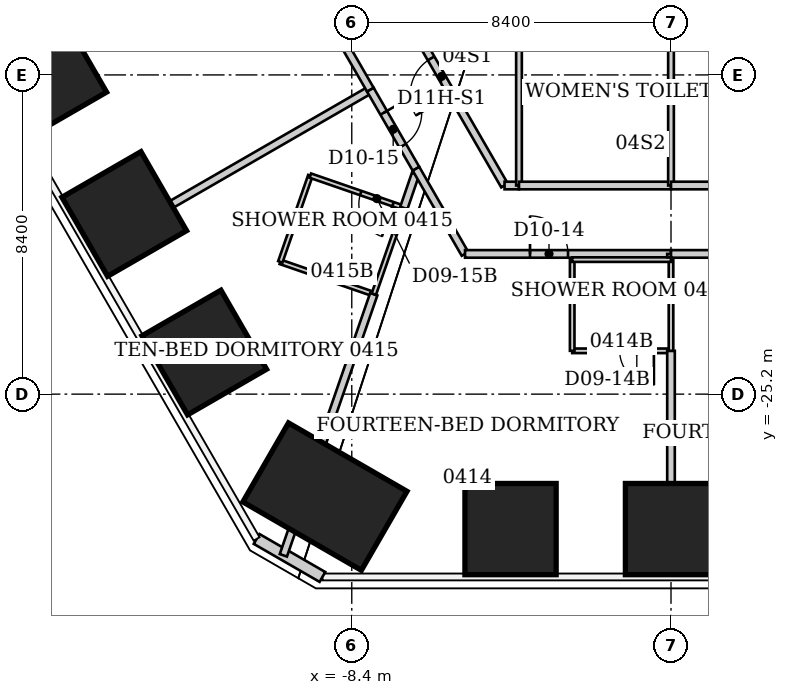
"""IFC4 building model, lengths in metres.
Left out: names, types, materials, properties, quantities, classifications, styles, units other than length and angle.
Written with IfcOpenShell. Run it as: python <this file> out.ifc"""

import sys

from ifc_helpers import new_model, si_unit, direction, frame, frame_2d, origin, origin_2d, place, context, subcontext, project, spatial, rectangle, extrude, element, fill, save


model = new_model("IFC4")
c1 = context("Model", 3, precision=1e-05, world=origin(), true_north=direction((0.0, 1.0)))
c2 = subcontext(c1, "Body", "Model", "MODEL_VIEW")
j1 = project(units=[si_unit("LENGTHUNIT", "METRE"), si_unit("PLANEANGLEUNIT", "RADIAN")], contexts=[c1])
p1 = place(None, origin())
s1 = spatial("IfcSite", under=j1, at=p1, CompositionType="ELEMENT")
p2 = place(p1, origin())
s2 = spatial("IfcBuilding", under=s1, at=p2, CompositionType="ELEMENT")
p3 = place(p2, frame((0.0, 0.0, 23.0)))
s3 = spatial("IfcBuildingStorey", under=s2, at=p3, CompositionType="ELEMENT", Elevation=23.0)
for number, where, z_axis, x_axis in (
    (1, (0.0, -28.751, 0.0), (0.0, 0.0, 1.0), (0.0, -1.0, 0.0)),
    (2, (-4.222, -28.751, 0.0), (0.0, 0.0, 1.0), (0.0, -1.0, 0.0)),
):
    element("IfcColumn", number, at=place(p3, frame(where, z_axis=z_axis, x_axis=x_axis)), inside=s3, PredefinedType="COLUMN", context=c2, shape_type="SweptSolid", body=[
        extrude(rectangle(XDim=2.4, YDim=2.4, at=origin_2d()), origin(), (0.0, 0.0, 1.0), 3.8),
    ])
p4 = place(p3, frame((-9.106, -27.897, 0.0), z_axis=(0.0, 0.0, 1.0), x_axis=(-0.5, -0.866025403784, 0.0)))
e3 = element("IfcColumn", 3, at=p4, inside=s3, PredefinedType="COLUMN", context=c2, shape_type="SweptSolid", body=[
    extrude(rectangle(XDim=2.4, YDim=3.6, at=origin_2d()), origin(), (0.0, 0.0, 1.0), 3.8),
])
for number, where, z_axis, x_axis in (
    (4, (-12.282, -24.105, 0.0), (0.0, 0.0, 1.0), (-0.866, -0.5, 0.0)),
    (5, (-14.387, -20.459, 0.0), (0.0, 0.0, 1.0), (-0.866, -0.5, 0.0)),
    (6, (-16.491, -16.813, 0.0), (0.0, 0.0, 1.0), (-0.866, -0.5, 0.0)),
):
    element("IfcColumn", number, at=place(p3, frame(where, z_axis=z_axis, x_axis=x_axis)), inside=s3, PredefinedType="COLUMN", context=c2, shape_type="SweptSolid", body=[
        extrude(rectangle(XDim=2.4, YDim=2.4, at=origin_2d()), origin(), (0.0, 0.0, 1.0), 3.8),
    ])
p5 = place(p3, frame((-9.172, -30.011, 0.0), z_axis=(0.0, 0.0, 1.0), x_axis=(-0.866010750942, 0.50002537861, 0.0)))
e7 = element("IfcWall", 7, at=p5, inside=s3, PredefinedType="SOLIDWALL", context=c2, shape_type="SweptSolid", body=[
    extrude(rectangle(XDim=2.0, YDim=0.3, at=frame_2d((1.0, 0.0))), origin(), (0.0, 0.0, 1.0), 3.64),
])
p6 = place(p3, frame((-15.176, -21.38, 0.0), z_axis=(0.0, 0.0, 1.0), x_axis=(0.866276837306, 0.49956425127, 0.0)))
e8 = element("IfcWall", 8, at=p6, inside=s3, PredefinedType="PARTITIONING", context=c2, shape_type="SweptSolid", body=[
    extrude(rectangle(XDim=8.373, YDim=0.2, at=frame_2d((4.186, 0.0))), origin(), (0.0, 0.0, 1.0), 3.64),
])
p7 = place(p3, frame((-11.06, -11.74, 0.0), z_axis=(0.0, 0.0, 1.0), x_axis=(0.500384855356, -0.865803093394, 0.0)))
e9 = element("IfcWall", 9, at=p7, inside=s3, PredefinedType="PARTITIONING", context=c2, shape_type="SweptSolid", body=[
    extrude(rectangle(XDim=6.295, YDim=0.2, at=frame_2d((3.147, 0.0))), origin(), (0.0, 0.0, 1.0), 3.64),
])
p8 = place(p7, frame((2.647, 0.0, 0.0)))
e10 = element("IfcOpeningElement", 10, at=p8, cuts=e9, PredefinedType="OPENING", context=c2, shape_type="SweptSolid", body=[
    extrude(rectangle(XDim=1.0, YDim=2.13, at=frame_2d((0.5, 1.065))), frame((0.0, 0.1, 0.0), z_axis=(0.0, -1.0, 0.0), x_axis=(1.0, 0.0, 0.0)), (0.0, 0.0, 1.0), 0.2),
])
p9 = place(p3, frame((-10.28, -21.72, 0.0), z_axis=(0.0, 0.0, 1.0), x_axis=(0.94515546045, -0.326620813149, 0.0)))
e11 = element("IfcWall", 11, at=p9, inside=s3, PredefinedType="PARTITIONING", context=c2, shape_type="SweptSolid", body=[
    extrude(rectangle(XDim=2.603, YDim=0.12, at=frame_2d((1.301, 0.0))), origin(), (0.0, 0.0, 1.0), 3.64),
])
p10 = place(p3, frame((-10.2, -29.442, 0.0), z_axis=(0.0, 0.0, 1.0), x_axis=(0.327154379454, 0.944970905374, 0.0)))
e12 = element("IfcWall", 12, at=p10, inside=s3, PredefinedType="PARTITIONING", context=c2, shape_type="SweptSolid", body=[
    extrude(rectangle(XDim=7.272, YDim=0.2, at=frame_2d((3.636, 0.0))), origin(), (0.0, 0.0, 1.0), 3.64),
])
p11 = place(p3, frame((-9.49, -19.45, 0.0), z_axis=(0.0, 0.0, 1.0), x_axis=(-0.328693963496, -0.944436487203, 0.0)))
e13 = element("IfcWall", 13, at=p11, inside=s3, PredefinedType="PARTITIONING", context=c2, shape_type="SweptSolid", body=[
    extrude(rectangle(XDim=2.404, YDim=0.12, at=frame_2d((1.202, 0.0))), origin(), (0.0, 0.0, 1.0), 3.64),
])
p12 = place(p3, frame((-7.91, -17.19, 0.0), z_axis=(0.0, 0.0, 1.0), x_axis=(0.499693115345, -0.866202511239, 0.0)))
e14 = element("IfcWall", 14, at=p12, inside=s3, PredefinedType="PARTITIONING", context=c2, shape_type="SweptSolid", body=[
    extrude(rectangle(XDim=2.401, YDim=0.2, at=frame_2d((1.201, 0.0))), origin(), (0.0, 0.0, 1.0), 3.64),
])
p13 = place(p12, frame((0.701, 0.0, 0.0)))
e15 = element("IfcOpeningElement", 15, at=p13, cuts=e14, PredefinedType="OPENING", context=c2, shape_type="SweptSolid", body=[
    extrude(rectangle(XDim=1.0, YDim=2.13, at=frame_2d((0.5, 1.065))), frame((0.0, 0.1, 0.0), z_axis=(0.0, -1.0, 0.0), x_axis=(1.0, 0.0, 0.0)), (0.0, 0.0, 1.0), 0.2),
])
p14 = place(p3, frame((-7.82, -22.57, 0.0), z_axis=(0.0, 0.0, 1.0), x_axis=(0.328693963496, 0.944436487203, 0.0)))
e16 = element("IfcWall", 16, at=p14, inside=s3, PredefinedType="PARTITIONING", context=c2, shape_type="SweptSolid", body=[
    extrude(rectangle(XDim=2.404, YDim=0.12, at=frame_2d((1.202, 0.0))), origin(), (0.0, 0.0, 1.0), 3.64),
])
p15 = place(p3, frame((-7.03, -20.3, 0.0), z_axis=(0.0, 0.0, 1.0), x_axis=(-0.94515546045, 0.326620813149, 0.0)))
e17 = element("IfcWall", 17, at=p15, inside=s3, PredefinedType="PARTITIONING", context=c2, shape_type="SweptSolid", body=[
    extrude(rectangle(XDim=2.603, YDim=0.12, at=frame_2d((1.301, 0.0))), origin(), (0.0, 0.0, 1.0), 3.64),
])
p16 = place(p15, frame((0.3, 0.0, 0.0)))
e18 = element("IfcOpeningElement", 18, at=p16, cuts=e17, PredefinedType="OPENING", context=c2, shape_type="SweptSolid", body=[
    extrude(rectangle(XDim=0.9, YDim=2.03, at=frame_2d((0.45, 1.015))), frame((0.0, 0.06, 0.0), z_axis=(0.0, -1.0, 0.0), x_axis=(1.0, 0.0, 0.0)), (0.0, 0.0, 1.0), 0.12),
])
p17 = place(p3, frame((-7.03, -20.3, 0.0), z_axis=(0.0, 0.0, 1.0), x_axis=(0.32487799312, 0.945755935528, 0.0)))
e19 = element("IfcWall", 19, at=p17, inside=s3, PredefinedType="PARTITIONING", context=c2, shape_type="SweptSolid", body=[
    extrude(rectangle(XDim=0.947, YDim=0.2, at=frame_2d((0.473, 0.0))), origin(), (0.0, 0.0, 1.0), 3.64),
])
p18 = place(p3, frame((-5.42, -21.51, 0.0), z_axis=(0.0, 0.0, 1.0), x_axis=(-0.499065468721, 0.866564283784, 0.0)))
e20 = element("IfcWall", 20, at=p18, inside=s3, PredefinedType="PARTITIONING", context=c2, shape_type="SweptSolid", body=[
    extrude(rectangle(XDim=2.585, YDim=0.2, at=frame_2d((1.292, 0.0))), origin(), (0.0, 0.0, 1.0), 3.64),
])
p19 = place(p3, frame((-5.42, -21.51, 0.0), z_axis=(0.0, 0.0, 1.0), x_axis=(1.0, 0.0, 0.0)))
e21 = element("IfcWall", 21, at=p19, inside=s3, PredefinedType="PARTITIONING", context=c2, shape_type="SweptSolid", body=[
    extrude(rectangle(XDim=5.42, YDim=0.2, at=frame_2d((2.71, 0.0))), origin(), (0.0, 0.0, 1.0), 3.64),
])
p20 = place(p19, frame((1.71, 0.0, 0.0)))
e22 = element("IfcOpeningElement", 22, at=p20, cuts=e21, PredefinedType="OPENING", context=c2, shape_type="SweptSolid", body=[
    extrude(rectangle(XDim=1.0, YDim=2.13, at=frame_2d((0.5, 1.065))), frame((0.0, 0.1, 0.0), z_axis=(0.0, -1.0, 0.0), x_axis=(1.0, 0.0, 0.0)), (0.0, 0.0, 1.0), 0.2),
])
p21 = place(p3, frame((-4.38, -19.71, 0.0), z_axis=(0.0, 0.0, 1.0), x_axis=(-0.500523653757, 0.865722860984, 0.0)))
e23 = element("IfcWall", 23, at=p21, inside=s3, PredefinedType="PARTITIONING", context=c2, shape_type="SweptSolid", body=[
    extrude(rectangle(XDim=6.628, YDim=0.2, at=frame_2d((3.314, 0.0))), origin(), (0.0, 0.0, 1.0), 3.64),
])
p22 = place(p21, frame((2.764, 0.0, 0.0)))
e24 = element("IfcOpeningElement", 24, at=p22, cuts=e23, PredefinedType="OPENING", context=c2, shape_type="SweptSolid", body=[
    extrude(rectangle(XDim=1.1, YDim=2.2, at=frame_2d((0.55, 1.1))), frame((0.0, 0.1, 0.0), z_axis=(0.0, -1.0, 0.0), x_axis=(1.0, 0.0, 0.0)), (0.0, 0.0, 1.0), 0.2),
])
p23 = place(p3, frame((-4.0, -19.71, 0.0), z_axis=(0.0, 0.0, 1.0), x_axis=(-1.0, 0.0, 0.0)))
e25 = element("IfcWall", 25, at=p23, inside=s3, PredefinedType="PARTITIONING", context=c2, shape_type="SweptSolid", body=[
    extrude(rectangle(XDim=0.38, YDim=0.2, at=frame_2d((0.19, 0.0))), origin(), (0.0, 0.0, 1.0), 3.64),
])
p24 = place(p3, frame((-4.0, -14.0, 0.0), z_axis=(0.0, 0.0, 1.0), x_axis=(0.0, -1.0, 0.0)))
e26 = element("IfcWall", 26, at=p24, inside=s3, PredefinedType="PARTITIONING", context=c2, shape_type="SweptSolid", body=[
    extrude(rectangle(XDim=5.71, YDim=0.15, at=frame_2d((2.855, 0.0))), origin(), (0.0, 0.0, 1.0), 3.64),
])
p25 = place(p3, frame((-2.6, -24.06, 0.0), z_axis=(0.0, 0.0, 1.0), x_axis=(1.0, 0.0, 0.0)))
e27 = element("IfcWall", 27, at=p25, inside=s3, PredefinedType="PARTITIONING", context=c2, shape_type="SweptSolid", body=[
    extrude(rectangle(XDim=2.6, YDim=0.12, at=frame_2d((1.3, 0.0))), origin(), (0.0, 0.0, 1.0), 3.64),
])
p26 = place(p25, frame((1.25, 0.0, 0.0)))
e28 = element("IfcOpeningElement", 28, at=p26, cuts=e27, PredefinedType="OPENING", context=c2, shape_type="SweptSolid", body=[
    extrude(rectangle(XDim=0.9, YDim=2.03, at=frame_2d((0.45, 1.015))), frame((0.0, 0.06, 0.0), z_axis=(0.0, -1.0, 0.0), x_axis=(1.0, 0.0, 0.0)), (0.0, 0.0, 1.0), 0.12),
])
p27 = place(p3, frame((-2.6, -21.66, 0.0), z_axis=(0.0, 0.0, 1.0), x_axis=(0.0, -1.0, 0.0)))
e29 = element("IfcWall", 29, at=p27, inside=s3, PredefinedType="PARTITIONING", context=c2, shape_type="SweptSolid", body=[
    extrude(rectangle(XDim=2.4, YDim=0.12, at=frame_2d((1.2, 0.0))), origin(), (0.0, 0.0, 1.0), 3.64),
])
p28 = place(p3, frame((0.0, -29.89, 0.0), z_axis=(0.0, 0.0, 1.0), x_axis=(0.0, 1.0, 0.0)))
e30 = element("IfcWall", 30, at=p28, inside=s3, PredefinedType="PARTITIONING", context=c2, shape_type="SweptSolid", body=[
    extrude(rectangle(XDim=5.83, YDim=0.2, at=frame_2d((2.915, 0.0))), origin(), (0.0, 0.0, 1.0), 2.86),
])
p29 = place(p3, frame((0.0, -24.06, 0.0), z_axis=(0.0, 0.0, 1.0), x_axis=(0.0, 1.0, 0.0)))
e31 = element("IfcWall", 31, at=p29, inside=s3, PredefinedType="PARTITIONING", context=c2, shape_type="SweptSolid", body=[
    extrude(rectangle(XDim=2.4, YDim=0.12, at=frame_2d((1.2, 0.0))), origin(), (0.0, 0.0, 1.0), 2.86),
])
p30 = place(p3, frame((0.0, -21.66, 0.0), z_axis=(0.0, 0.0, 1.0), x_axis=(-1.0, 0.0, 0.0)))
e32 = element("IfcWall", 32, at=p30, inside=s3, PredefinedType="PARTITIONING", context=c2, shape_type="SweptSolid", body=[
    extrude(rectangle(XDim=2.6, YDim=0.12, at=frame_2d((1.3, 0.0))), origin(), (0.0, 0.0, 1.0), 3.64),
])
p31 = place(p3, frame((0.0, -21.6, 0.0), z_axis=(0.0, 0.0, 1.0), x_axis=(0.0, 1.0, 0.0)))
e33 = element("IfcWall", 33, at=p31, inside=s3, PredefinedType="PARTITIONING", context=c2, shape_type="SweptSolid", body=[
    extrude(rectangle(XDim=0.09, YDim=0.2, at=frame_2d((0.045, 0.0))), origin(), (0.0, 0.0, 1.0), 3.64),
])
p32 = place(p3, frame((0.0, -21.51, 0.0), z_axis=(0.0, 0.0, 1.0), x_axis=(1.0, 0.0, 0.0)))
e34 = element("IfcWall", 34, at=p32, inside=s3, PredefinedType="PARTITIONING", context=c2, shape_type="SweptSolid", body=[
    extrude(rectangle(XDim=5.42, YDim=0.2, at=frame_2d((2.71, 0.0))), origin(), (0.0, 0.0, 1.0), 3.64),
])
p33 = place(p32, frame((2.21, 0.0, 0.0)))
e35 = element("IfcOpeningElement", 35, at=p33, cuts=e34, PredefinedType="OPENING", context=c2, shape_type="SweptSolid", body=[
    extrude(rectangle(XDim=1.0, YDim=2.13, at=frame_2d((0.5, 1.065))), frame((0.0, 0.1, 0.0), z_axis=(0.0, -1.0, 0.0), x_axis=(1.0, 0.0, 0.0)), (0.0, 0.0, 1.0), 0.2),
])
p34 = place(p3, frame((0.0, -19.71, 0.0), z_axis=(0.0, 0.0, 1.0), x_axis=(-1.0, 0.0, 0.0)))
e36 = element("IfcWall", 36, at=p34, inside=s3, PredefinedType="PARTITIONING", context=c2, shape_type="SweptSolid", body=[
    extrude(rectangle(XDim=4.0, YDim=0.2, at=frame_2d((2.0, 0.0))), origin(), (0.0, 0.0, 1.0), 3.64),
])
p35 = place(p3, frame((0.0, -13.95, 0.0), z_axis=(0.0, 0.0, 1.0), x_axis=(0.0, -1.0, 0.0)))
e37 = element("IfcWall", 37, at=p35, inside=s3, PredefinedType="PARTITIONING", context=c2, shape_type="SweptSolid", body=[
    extrude(rectangle(XDim=5.76, YDim=0.15, at=frame_2d((2.88, 0.0))), origin(), (0.0, 0.0, 1.0), 2.86),
])
p36 = place(p3, frame((4.0, -19.71, 0.0), z_axis=(0.0, 0.0, 1.0), x_axis=(-1.0, 0.0, 0.0)))
e38 = element("IfcWall", 38, at=p36, inside=s3, PredefinedType="PARTITIONING", context=c2, shape_type="SweptSolid", body=[
    extrude(rectangle(XDim=4.0, YDim=0.2, at=frame_2d((2.0, 0.0))), origin(), (0.0, 0.0, 1.0), 3.64),
])
p37 = place(p36, frame((1.45, 0.0, 0.0)))
e39 = element("IfcOpeningElement", 39, at=p37, cuts=e38, PredefinedType="OPENING", context=c2, shape_type="SweptSolid", body=[
    extrude(rectangle(XDim=1.1, YDim=2.2, at=frame_2d((0.55, 1.1))), frame((0.0, 0.1, 0.0), z_axis=(0.0, -1.0, 0.0), x_axis=(1.0, 0.0, 0.0)), (0.0, 0.0, 1.0), 0.2),
])
p38 = place(p20, origin())
e40 = element("IfcDoor", 40, at=p38, inside=s3, OperationType="SINGLE_SWING_LEFT", PredefinedType="DOOR", context=c2, shape_type="SweptSolid", body=[
    extrude(rectangle(XDim=1.0, YDim=2.13, at=frame_2d((0.5, 1.065))), frame((0.0, 0.025, 0.0), z_axis=(0.0, -1.0, 0.0), x_axis=(1.0, 0.0, 0.0)), (0.0, 0.0, 1.0), 0.05),
])
fill(e22, e40)
p39 = place(p26, origin())
e41 = element("IfcDoor", 41, at=p39, inside=s3, OperationType="SINGLE_SWING_RIGHT", PredefinedType="DOOR", context=c2, shape_type="SweptSolid", body=[
    extrude(rectangle(XDim=0.9, YDim=2.03, at=frame_2d((0.45, 1.015))), frame((0.0, 0.025, 0.0), z_axis=(0.0, -1.0, 0.0), x_axis=(1.0, 0.0, 0.0)), (0.0, 0.0, 1.0), 0.05),
])
fill(e28, e41)
p40 = place(p13, origin())
e42 = element("IfcDoor", 42, at=p40, inside=s3, OperationType="SINGLE_SWING_LEFT", PredefinedType="DOOR", context=c2, shape_type="SweptSolid", body=[
    extrude(rectangle(XDim=1.0, YDim=2.13, at=frame_2d((0.5, 1.065))), frame((0.0, 0.025, 0.0), z_axis=(0.0, -1.0, 0.0), x_axis=(1.0, 0.0, 0.0)), (0.0, 0.0, 1.0), 0.05),
])
fill(e15, e42)
p41 = place(p16, origin())
e43 = element("IfcDoor", 43, at=p41, inside=s3, OperationType="SINGLE_SWING_LEFT", PredefinedType="DOOR", context=c2, shape_type="SweptSolid", body=[
    extrude(rectangle(XDim=0.9, YDim=2.03, at=frame_2d((0.45, 1.015))), frame((0.0, 0.025, 0.0), z_axis=(0.0, -1.0, 0.0), x_axis=(1.0, 0.0, 0.0)), (0.0, 0.0, 1.0), 0.05),
])
fill(e18, e43)
p42 = place(p22, origin())
e44 = element("IfcDoor", 44, at=p42, inside=s3, OperationType="SINGLE_SWING_LEFT", PredefinedType="DOOR", context=c2, shape_type="SweptSolid", body=[
    extrude(rectangle(XDim=1.1, YDim=2.2, at=frame_2d((0.55, 1.1))), frame((0.0, 0.025, 0.0), z_axis=(0.0, -1.0, 0.0), x_axis=(1.0, 0.0, 0.0)), (0.0, 0.0, 1.0), 0.05),
])
fill(e24, e44)
save(model, sys.argv[1])
